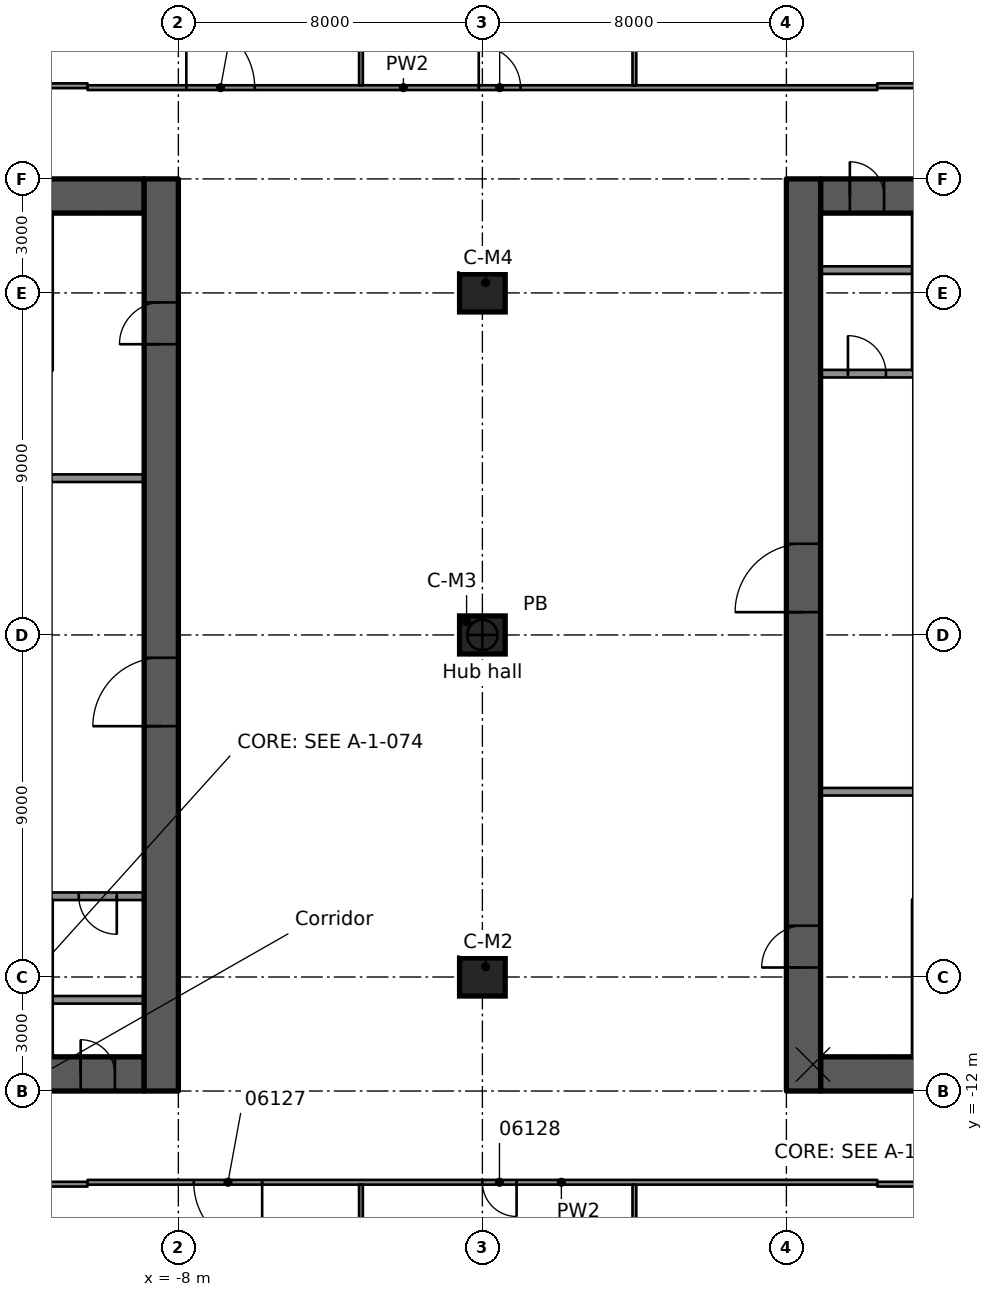
"""IFC4 building model, lengths in metres.
Left out: names, types, materials, properties, quantities, classifications, styles, units other than length and angle.
Written with IfcOpenShell. Run it as: python <this file> out.ifc"""

import sys

from ifc_helpers import new_model, si_unit, direction, frame, frame_2d, origin, origin_2d, place, context, subcontext, project, spatial, rectangle, extrude, element, fill, save


model = new_model("IFC4")
c1 = context("Model", 3, precision=1e-05, world=origin(), true_north=direction((0.0, 1.0)))
c2 = subcontext(c1, "Body", "Model", "MODEL_VIEW")
j1 = project(units=[si_unit("LENGTHUNIT", "METRE"), si_unit("PLANEANGLEUNIT", "RADIAN")], contexts=[c1])
p1 = place(None, origin())
s1 = spatial("IfcSite", under=j1, at=p1, CompositionType="ELEMENT")
p2 = place(p1, origin())
s2 = spatial("IfcBuilding", under=s1, at=p2, CompositionType="ELEMENT")
p3 = place(p2, frame((0.0, 0.0, 29.2)))
s3 = spatial("IfcBuildingStorey", under=s2, at=p3, CompositionType="ELEMENT", Elevation=29.2)
p4 = place(p3, frame((-18.1, 11.55, 0.0), z_axis=(0.0, 0.0, 1.0), x_axis=(1.0, 0.0, 0.0)))
e1 = element("IfcWall", 1, at=p4, inside=s3, PredefinedType="SHEAR", context=c2, shape_type="SweptSolid", body=[
    extrude(rectangle(XDim=9.2, YDim=0.9, at=frame_2d((4.6, 0.0))), origin(), (0.0, 0.0, 1.0), 4.1),
])
p5 = place(p4, frame((5.1, 0.0, 0.0)))
e2 = element("IfcOpeningElement", 2, at=p5, cuts=e1, PredefinedType="OPENING", context=c2, shape_type="SweptSolid", body=[
    extrude(rectangle(XDim=1.1, YDim=2.1, at=frame_2d((0.55, 1.05))), frame((0.0, 0.46, 0.0), z_axis=(0.0, -1.0, 0.0), x_axis=(1.0, 0.0, 0.0)), (0.0, 0.0, 1.0), 0.92),
])
p6 = place(p3, frame((-18.1, -11.55, 0.0), z_axis=(0.0, 0.0, 1.0), x_axis=(1.0, 0.0, 0.0)))
e3 = element("IfcWall", 3, at=p6, inside=s3, PredefinedType="SHEAR", context=c2, shape_type="SweptSolid", body=[
    extrude(rectangle(XDim=9.2, YDim=0.9, at=frame_2d((4.6, 0.0))), origin(), (0.0, 0.0, 1.0), 4.1),
])
p7 = place(p6, frame((5.1, 0.0, 0.0)))
e4 = element("IfcOpeningElement", 4, at=p7, cuts=e3, PredefinedType="OPENING", context=c2, shape_type="SweptSolid", body=[
    extrude(rectangle(XDim=1.1, YDim=2.1, at=frame_2d((0.55, 1.05))), frame((0.0, 0.46, 0.0), z_axis=(0.0, -1.0, 0.0), x_axis=(1.0, 0.0, 0.0)), (0.0, 0.0, 1.0), 0.92),
])
p8 = place(p6, frame((7.53, 0.0, 0.0)))
e5 = element("IfcOpeningElement", 5, at=p8, cuts=e3, PredefinedType="OPENING", context=c2, shape_type="SweptSolid", body=[
    extrude(rectangle(XDim=0.9, YDim=2.1, at=frame_2d((0.45, 1.05))), frame((0.0, 0.46, 0.0), z_axis=(0.0, -1.0, 0.0), x_axis=(1.0, 0.0, 0.0)), (0.0, 0.0, 1.0), 0.92),
])
p9 = place(p3, frame((-8.45, -12.0, 0.0), z_axis=(0.0, 0.0, 1.0), x_axis=(0.0, 1.0, 0.0)))
e6 = element("IfcWall", 6, at=p9, inside=s3, PredefinedType="SHEAR", context=c2, shape_type="SweptSolid", body=[
    extrude(rectangle(XDim=24.0, YDim=0.9, at=frame_2d((12.0, 0.0))), origin(), (0.0, 0.0, 1.0), 4.1),
])
p10 = place(p9, frame((9.6, 0.0, 0.0)))
e7 = element("IfcOpeningElement", 7, at=p10, cuts=e6, PredefinedType="OPENING", context=c2, shape_type="SweptSolid", body=[
    extrude(rectangle(XDim=1.8, YDim=2.1, at=frame_2d((0.9, 1.05))), frame((0.0, 0.46, 0.0), z_axis=(0.0, -1.0, 0.0), x_axis=(1.0, 0.0, 0.0)), (0.0, 0.0, 1.0), 0.92),
])
p11 = place(p9, frame((19.65, 0.0, 0.0)))
e8 = element("IfcOpeningElement", 8, at=p11, cuts=e6, PredefinedType="OPENING", context=c2, shape_type="SweptSolid", body=[
    extrude(rectangle(XDim=1.1, YDim=2.1, at=frame_2d((0.55, 1.05))), frame((0.0, 0.46, 0.0), z_axis=(0.0, -1.0, 0.0), x_axis=(1.0, 0.0, 0.0)), (0.0, 0.0, 1.0), 0.92),
])
p12 = place(p3, frame((8.9, 11.55, 0.0), z_axis=(0.0, 0.0, 1.0), x_axis=(1.0, 0.0, 0.0)))
e9 = element("IfcWall", 9, at=p12, inside=s3, PredefinedType="SHEAR", context=c2, shape_type="SweptSolid", body=[
    extrude(rectangle(XDim=9.2, YDim=0.9, at=frame_2d((4.6, 0.0))), origin(), (0.0, 0.0, 1.0), 4.1),
])
p13 = place(p12, frame((3.0, 0.0, 0.0)))
e10 = element("IfcOpeningElement", 10, at=p13, cuts=e9, PredefinedType="OPENING", context=c2, shape_type="SweptSolid", body=[
    extrude(rectangle(XDim=1.1, YDim=2.1, at=frame_2d((0.55, 1.05))), frame((0.0, 0.46, 0.0), z_axis=(0.0, -1.0, 0.0), x_axis=(1.0, 0.0, 0.0)), (0.0, 0.0, 1.0), 0.92),
])
p14 = place(p12, frame((0.77, 0.0, 0.0)))
e11 = element("IfcOpeningElement", 11, at=p14, cuts=e9, PredefinedType="OPENING", context=c2, shape_type="SweptSolid", body=[
    extrude(rectangle(XDim=0.9, YDim=2.1, at=frame_2d((0.45, 1.05))), frame((0.0, 0.46, 0.0), z_axis=(0.0, -1.0, 0.0), x_axis=(1.0, 0.0, 0.0)), (0.0, 0.0, 1.0), 0.92),
])
p15 = place(p3, frame((8.9, -11.55, 0.0), z_axis=(0.0, 0.0, 1.0), x_axis=(1.0, 0.0, 0.0)))
e12 = element("IfcWall", 12, at=p15, inside=s3, PredefinedType="SHEAR", context=c2, shape_type="SweptSolid", body=[
    extrude(rectangle(XDim=9.2, YDim=0.9, at=frame_2d((4.6, 0.0))), origin(), (0.0, 0.0, 1.0), 4.1),
])
p16 = place(p15, frame((3.0, 0.0, 0.0)))
e13 = element("IfcOpeningElement", 13, at=p16, cuts=e12, PredefinedType="OPENING", context=c2, shape_type="SweptSolid", body=[
    extrude(rectangle(XDim=1.1, YDim=2.1, at=frame_2d((0.55, 1.05))), frame((0.0, 0.46, 0.0), z_axis=(0.0, -1.0, 0.0), x_axis=(1.0, 0.0, 0.0)), (0.0, 0.0, 1.0), 0.92),
])
p17 = place(p3, frame((8.45, -12.0, 0.0), z_axis=(0.0, 0.0, 1.0), x_axis=(0.0, 1.0, 0.0)))
e14 = element("IfcWall", 14, at=p17, inside=s3, PredefinedType="SHEAR", context=c2, shape_type="SweptSolid", body=[
    extrude(rectangle(XDim=24.0, YDim=0.9, at=frame_2d((12.0, 0.0))), origin(), (0.0, 0.0, 1.0), 4.1),
])
p18 = place(p17, frame((12.6, 0.0, 0.0)))
e15 = element("IfcOpeningElement", 15, at=p18, cuts=e14, PredefinedType="OPENING", context=c2, shape_type="SweptSolid", body=[
    extrude(rectangle(XDim=1.8, YDim=2.1, at=frame_2d((0.9, 1.05))), frame((0.0, 0.46, 0.0), z_axis=(0.0, -1.0, 0.0), x_axis=(1.0, 0.0, 0.0)), (0.0, 0.0, 1.0), 0.92),
])
p19 = place(p17, frame((3.25, 0.0, 0.0)))
e16 = element("IfcOpeningElement", 16, at=p19, cuts=e14, PredefinedType="OPENING", context=c2, shape_type="SweptSolid", body=[
    extrude(rectangle(XDim=1.1, YDim=2.1, at=frame_2d((0.55, 1.05))), frame((0.0, 0.46, 0.0), z_axis=(0.0, -1.0, 0.0), x_axis=(1.0, 0.0, 0.0)), (0.0, 0.0, 1.0), 0.92),
])
for number, where, z_axis, x_axis in (
    (17, (0.0, -9.0, 0.0), (0.0, 0.0, 1.0), (1.0, 0.0, 0.0)),
    (18, (0.0, 0.0, 0.0), (0.0, 0.0, 1.0), (1.0, 0.0, 0.0)),
    (19, (0.0, 9.0, 0.0), (0.0, 0.0, 1.0), (1.0, 0.0, 0.0)),
):
    element("IfcColumn", number, at=place(p3, frame(where, z_axis=z_axis, x_axis=x_axis)), inside=s3, PredefinedType="COLUMN", context=c2, shape_type="SweptSolid", body=[
        extrude(rectangle(XDim=1.2, YDim=1.0, at=origin_2d()), origin(), (0.0, 0.0, 1.0), 4.1),
    ])
p20 = place(p3, frame((-8.9, 4.125, 0.0), z_axis=(0.0, 0.0, 1.0), x_axis=(-1.0, 0.0, 0.0)))
e20 = element("IfcWall", 20, at=p20, inside=s3, PredefinedType="PARTITIONING", context=c2, shape_type="SweptSolid", body=[
    extrude(rectangle(XDim=2.44, YDim=0.2, at=frame_2d((1.22, 0.0))), origin(), (0.0, 0.0, 1.0), 3.68),
])
p21 = place(p3, frame((-8.9, -6.875, 0.0), z_axis=(0.0, 0.0, 1.0), x_axis=(-1.0, 0.0, 0.0)))
e21 = element("IfcWall", 21, at=p21, inside=s3, PredefinedType="PARTITIONING", context=c2, shape_type="SweptSolid", body=[
    extrude(rectangle(XDim=2.44, YDim=0.2, at=frame_2d((1.22, 0.0))), origin(), (0.0, 0.0, 1.0), 3.68),
])
p22 = place(p21, frame((0.72, 0.0, 0.0)))
e22 = element("IfcOpeningElement", 22, at=p22, cuts=e21, PredefinedType="OPENING", context=c2, shape_type="SweptSolid", body=[
    extrude(rectangle(XDim=1.0, YDim=2.1, at=frame_2d((0.5, 1.05))), frame((0.0, 0.11, 0.0), z_axis=(0.0, -1.0, 0.0), x_axis=(1.0, 0.0, 0.0)), (0.0, 0.0, 1.0), 0.22),
])
for number, where, z_axis, x_axis in (
    (23, (-8.9, -9.6, 0.0), (0.0, 0.0, 1.0), (-1.0, 0.0, 0.0)),
    (24, (8.9, -4.125, 0.0), (0.0, 0.0, 1.0), (1.0, 0.0, 0.0)),
):
    element("IfcWall", number, at=place(p3, frame(where, z_axis=z_axis, x_axis=x_axis)), inside=s3, PredefinedType="PARTITIONING", context=c2, shape_type="SweptSolid", body=[
        extrude(rectangle(XDim=2.44, YDim=0.2, at=frame_2d((1.22, 0.0))), origin(), (0.0, 0.0, 1.0), 3.68),
    ])
p23 = place(p3, frame((8.9, 6.875, 0.0), z_axis=(0.0, 0.0, 1.0), x_axis=(1.0, 0.0, 0.0)))
e25 = element("IfcWall", 25, at=p23, inside=s3, PredefinedType="PARTITIONING", context=c2, shape_type="SweptSolid", body=[
    extrude(rectangle(XDim=2.44, YDim=0.2, at=frame_2d((1.22, 0.0))), origin(), (0.0, 0.0, 1.0), 3.68),
])
p24 = place(p23, frame((0.72, 0.0, 0.0)))
e26 = element("IfcOpeningElement", 26, at=p24, cuts=e25, PredefinedType="OPENING", context=c2, shape_type="SweptSolid", body=[
    extrude(rectangle(XDim=1.0, YDim=2.1, at=frame_2d((0.5, 1.05))), frame((0.0, 0.11, 0.0), z_axis=(0.0, -1.0, 0.0), x_axis=(1.0, 0.0, 0.0)), (0.0, 0.0, 1.0), 0.22),
])
p25 = place(p3, frame((8.9, 9.6, 0.0), z_axis=(0.0, 0.0, 1.0), x_axis=(1.0, 0.0, 0.0)))
e27 = element("IfcWall", 27, at=p25, inside=s3, PredefinedType="PARTITIONING", context=c2, shape_type="SweptSolid", body=[
    extrude(rectangle(XDim=2.44, YDim=0.2, at=frame_2d((1.22, 0.0))), origin(), (0.0, 0.0, 1.0), 3.68),
])
p26 = place(p3, frame((-18.262, -14.451, 0.0), z_axis=(0.0, 0.0, 1.0), x_axis=(1.0, 0.0, 0.0)))
e28 = element("IfcWall", 28, at=p26, inside=s3, PredefinedType="PARTITIONING", context=c2, shape_type="SweptSolid", body=[
    extrude(rectangle(XDim=7.871, YDim=0.125, at=frame_2d((3.936, 0.0))), origin(), (0.0, 0.0, 1.0), 3.66),
])
p27 = place(p3, frame((10.391, -14.451, 0.0), z_axis=(0.0, 0.0, 1.0), x_axis=(1.0, 0.0, 0.0)))
e29 = element("IfcWall", 29, at=p27, inside=s3, PredefinedType="PARTITIONING", context=c2, shape_type="SweptSolid", body=[
    extrude(rectangle(XDim=6.911, YDim=0.125, at=frame_2d((3.456, 0.0))), origin(), (0.0, 0.0, 1.0), 3.66),
])
p28 = place(p3, frame((10.391, -14.401, 0.0), z_axis=(0.0, 0.0, 1.0), x_axis=(-1.0, 0.0, 0.0)))
e30 = element("IfcWall", 30, at=p28, inside=s3, PredefinedType="PARTITIONING", context=c2, shape_type="SweptSolid", body=[
    extrude(rectangle(XDim=20.781, YDim=0.125, at=frame_2d((10.391, 0.0))), origin(), (0.0, 0.0, 1.0), 3.66),
])
p29 = place(p28, frame((16.186, 0.0, 0.0)))
e31 = element("IfcOpeningElement", 31, at=p29, cuts=e30, PredefinedType="OPENING", context=c2, shape_type="SweptSolid", body=[
    extrude(rectangle(XDim=1.8, YDim=2.1, at=frame_2d((0.9, 1.05))), frame((0.0, 0.073, 0.0), z_axis=(0.0, -1.0, 0.0), x_axis=(1.0, 0.0, 0.0)), (0.0, 0.0, 1.0), 0.145),
])
p30 = place(p28, frame((9.491, 0.0, 0.0)))
e32 = element("IfcOpeningElement", 32, at=p30, cuts=e30, PredefinedType="OPENING", context=c2, shape_type="SweptSolid", body=[
    extrude(rectangle(XDim=0.9, YDim=2.1, at=frame_2d((0.45, 1.05))), frame((0.0, 0.073, 0.0), z_axis=(0.0, -1.0, 0.0), x_axis=(1.0, 0.0, 0.0)), (0.0, 0.0, 1.0), 0.145),
])
p31 = place(p3, frame((-10.39, 14.401, 0.0), z_axis=(0.0, 0.0, 1.0), x_axis=(1.0, 0.0, 0.0)))
e33 = element("IfcWall", 33, at=p31, inside=s3, PredefinedType="PARTITIONING", context=c2, shape_type="SweptSolid", body=[
    extrude(rectangle(XDim=20.781, YDim=0.125, at=frame_2d((10.391, 0.0))), origin(), (0.0, 0.0, 1.0), 3.66),
])
p32 = place(p31, frame((10.295, 0.0, 0.0)))
e34 = element("IfcOpeningElement", 34, at=p32, cuts=e33, PredefinedType="OPENING", context=c2, shape_type="SweptSolid", body=[
    extrude(rectangle(XDim=1.1, YDim=2.1, at=frame_2d((0.55, 1.05))), frame((0.0, 0.073, 0.0), z_axis=(0.0, -1.0, 0.0), x_axis=(1.0, 0.0, 0.0)), (0.0, 0.0, 1.0), 0.145),
])
p33 = place(p31, frame((2.6, 0.0, 0.0)))
e35 = element("IfcOpeningElement", 35, at=p33, cuts=e33, PredefinedType="OPENING", context=c2, shape_type="SweptSolid", body=[
    extrude(rectangle(XDim=1.8, YDim=2.1, at=frame_2d((0.9, 1.05))), frame((0.0, 0.073, 0.0), z_axis=(0.0, -1.0, 0.0), x_axis=(1.0, 0.0, 0.0)), (0.0, 0.0, 1.0), 0.145),
])
p34 = place(p3, frame((-21.387, 14.451, 0.0), z_axis=(0.0, 0.0, 1.0), x_axis=(1.0, 0.0, 0.0)))
e36 = element("IfcWall", 36, at=p34, inside=s3, PredefinedType="PARTITIONING", context=c2, shape_type="SweptSolid", body=[
    extrude(rectangle(XDim=10.996, YDim=0.125, at=frame_2d((5.498, 0.0))), origin(), (0.0, 0.0, 1.0), 3.66),
])
p35 = place(p34, frame((3.788, 0.0, 0.0)))
e37 = element("IfcOpeningElement", 37, at=p35, cuts=e36, PredefinedType="OPENING", context=c2, shape_type="SweptSolid", body=[
    extrude(rectangle(XDim=1.8, YDim=2.1, at=frame_2d((0.9, 1.05))), frame((0.0, 0.073, 0.0), z_axis=(0.0, -1.0, 0.0), x_axis=(1.0, 0.0, 0.0)), (0.0, 0.0, 1.0), 0.145),
])
p36 = place(p3, frame((10.391, 14.451, 0.0), z_axis=(0.0, 0.0, 1.0), x_axis=(1.0, 0.0, 0.0)))
e38 = element("IfcWall", 38, at=p36, inside=s3, PredefinedType="PARTITIONING", context=c2, shape_type="SweptSolid", body=[
    extrude(rectangle(XDim=10.996, YDim=0.125, at=frame_2d((5.498, 0.0))), origin(), (0.0, 0.0, 1.0), 3.66),
])
p37 = place(p36, frame((1.85, 0.0, 0.0)))
e39 = element("IfcOpeningElement", 39, at=p37, cuts=e38, PredefinedType="OPENING", context=c2, shape_type="SweptSolid", body=[
    extrude(rectangle(XDim=1.8, YDim=2.1, at=frame_2d((0.9, 1.05))), frame((0.0, 0.073, 0.0), z_axis=(0.0, -1.0, 0.0), x_axis=(1.0, 0.0, 0.0)), (0.0, 0.0, 1.0), 0.145),
])
p38 = place(p3, frame((4.0, -30.25, 0.0), z_axis=(0.0, 0.0, 1.0), x_axis=(0.0, 1.0, 0.0)))
e40 = element("IfcWall", 40, at=p38, inside=s3, PredefinedType="PARTITIONING", context=c2, shape_type="SweptSolid", body=[
    extrude(rectangle(XDim=15.787, YDim=0.1, at=frame_2d((7.894, 0.0))), origin(), (0.0, 0.0, 1.0), 3.66),
])
for number, where, z_axis, x_axis in (
    (41, (4.0, 14.463, 0.0), (0.0, 0.0, 1.0), (0.0, 1.0, 0.0)),
    (42, (-3.195, -30.25, 0.0), (0.0, 0.0, 1.0), (0.0, 1.0, 0.0)),
):
    element("IfcWall", number, at=place(p3, frame(where, z_axis=z_axis, x_axis=x_axis)), inside=s3, PredefinedType="PARTITIONING", context=c2, shape_type="SweptSolid", body=[
        extrude(rectangle(XDim=15.787, YDim=0.1, at=frame_2d((7.894, 0.0))), origin(), (0.0, 0.0, 1.0), 3.025),
    ])
p39 = place(p3, frame((-3.195, 14.463, 0.0), z_axis=(0.0, 0.0, 1.0), x_axis=(0.0, 1.0, 0.0)))
e43 = element("IfcWall", 43, at=p39, inside=s3, PredefinedType="PARTITIONING", context=c2, shape_type="SweptSolid", body=[
    extrude(rectangle(XDim=15.787, YDim=0.1, at=frame_2d((7.894, 0.0))), origin(), (0.0, 0.0, 1.0), 3.66),
])
p40 = place(p10, origin())
e44 = element("IfcDoor", 44, at=p40, inside=s3, OperationType="SINGLE_SWING_LEFT", PredefinedType="DOOR", context=c2, shape_type="SweptSolid", body=[
    extrude(rectangle(XDim=1.8, YDim=2.1, at=frame_2d((0.9, 1.05))), frame((0.0, 0.025, 0.0), z_axis=(0.0, -1.0, 0.0), x_axis=(1.0, 0.0, 0.0)), (0.0, 0.0, 1.0), 0.05),
])
fill(e7, e44)
p41 = place(p11, origin())
e45 = element("IfcDoor", 45, at=p41, inside=s3, OperationType="SINGLE_SWING_RIGHT", PredefinedType="DOOR", context=c2, shape_type="SweptSolid", body=[
    extrude(rectangle(XDim=1.1, YDim=2.1, at=frame_2d((0.55, 1.05))), frame((0.0, 0.025, 0.0), z_axis=(0.0, -1.0, 0.0), x_axis=(1.0, 0.0, 0.0)), (0.0, 0.0, 1.0), 0.05),
])
fill(e8, e45)
p42 = place(p8, origin())
e46 = element("IfcDoor", 46, at=p42, inside=s3, OperationType="SINGLE_SWING_RIGHT", PredefinedType="DOOR", context=c2, shape_type="SweptSolid", body=[
    extrude(rectangle(XDim=0.9, YDim=2.1, at=frame_2d((0.45, 1.05))), frame((0.0, 0.025, 0.0), z_axis=(0.0, -1.0, 0.0), x_axis=(1.0, 0.0, 0.0)), (0.0, 0.0, 1.0), 0.05),
])
fill(e5, e46)
p43 = place(p22, origin())
e47 = element("IfcDoor", 47, at=p43, inside=s3, OperationType="SINGLE_SWING_RIGHT", PredefinedType="DOOR", context=c2, shape_type="SweptSolid", body=[
    extrude(rectangle(XDim=1.0, YDim=2.1, at=frame_2d((0.5, 1.05))), frame((0.0, 0.025, 0.0), z_axis=(0.0, -1.0, 0.0), x_axis=(1.0, 0.0, 0.0)), (0.0, 0.0, 1.0), 0.05),
])
fill(e22, e47)
p44 = place(p18, origin())
e48 = element("IfcDoor", 48, at=p44, inside=s3, OperationType="SINGLE_SWING_RIGHT", PredefinedType="DOOR", context=c2, shape_type="SweptSolid", body=[
    extrude(rectangle(XDim=1.8, YDim=2.1, at=frame_2d((0.9, 1.05))), frame((0.0, 0.025, 0.0), z_axis=(0.0, -1.0, 0.0), x_axis=(1.0, 0.0, 0.0)), (0.0, 0.0, 1.0), 0.05),
])
fill(e15, e48)
p45 = place(p19, origin())
e49 = element("IfcDoor", 49, at=p45, inside=s3, OperationType="SINGLE_SWING_LEFT", PredefinedType="DOOR", context=c2, shape_type="SweptSolid", body=[
    extrude(rectangle(XDim=1.1, YDim=2.1, at=frame_2d((0.55, 1.05))), frame((0.0, 0.025, 0.0), z_axis=(0.0, -1.0, 0.0), x_axis=(1.0, 0.0, 0.0)), (0.0, 0.0, 1.0), 0.05),
])
fill(e16, e49)
p46 = place(p14, origin())
e50 = element("IfcDoor", 50, at=p46, inside=s3, OperationType="SINGLE_SWING_LEFT", PredefinedType="DOOR", context=c2, shape_type="SweptSolid", body=[
    extrude(rectangle(XDim=0.9, YDim=2.1, at=frame_2d((0.45, 1.05))), frame((0.0, 0.025, 0.0), z_axis=(0.0, -1.0, 0.0), x_axis=(1.0, 0.0, 0.0)), (0.0, 0.0, 1.0), 0.05),
])
fill(e11, e50)
p47 = place(p24, origin())
e51 = element("IfcDoor", 51, at=p47, inside=s3, OperationType="SINGLE_SWING_RIGHT", PredefinedType="DOOR", context=c2, shape_type="SweptSolid", body=[
    extrude(rectangle(XDim=1.0, YDim=2.1, at=frame_2d((0.5, 1.05))), frame((0.0, 0.025, 0.0), z_axis=(0.0, -1.0, 0.0), x_axis=(1.0, 0.0, 0.0)), (0.0, 0.0, 1.0), 0.05),
])
fill(e26, e51)
p48 = place(p29, origin())
e52 = element("IfcDoor", 52, at=p48, inside=s3, OperationType="DOUBLE_DOOR_SINGLE_SWING", PredefinedType="DOOR", context=c2, shape_type="SweptSolid", body=[
    extrude(rectangle(XDim=1.8, YDim=2.1, at=frame_2d((0.9, 1.05))), frame((0.0, 0.025, 0.0), z_axis=(0.0, -1.0, 0.0), x_axis=(1.0, 0.0, 0.0)), (0.0, 0.0, 1.0), 0.05),
])
fill(e31, e52)
p49 = place(p30, origin())
e53 = element("IfcDoor", 53, at=p49, inside=s3, OperationType="SINGLE_SWING_LEFT", PredefinedType="DOOR", context=c2, shape_type="SweptSolid", body=[
    extrude(rectangle(XDim=0.9, YDim=2.1, at=frame_2d((0.45, 1.05))), frame((0.0, 0.025, 0.0), z_axis=(0.0, -1.0, 0.0), x_axis=(1.0, 0.0, 0.0)), (0.0, 0.0, 1.0), 0.05),
])
fill(e32, e53)
p50 = place(p32, origin())
e54 = element("IfcDoor", 54, at=p50, inside=s3, OperationType="SINGLE_SWING_RIGHT", PredefinedType="DOOR", context=c2, shape_type="SweptSolid", body=[
    extrude(rectangle(XDim=1.1, YDim=2.1, at=frame_2d((0.55, 1.05))), frame((0.0, 0.025, 0.0), z_axis=(0.0, -1.0, 0.0), x_axis=(1.0, 0.0, 0.0)), (0.0, 0.0, 1.0), 0.05),
])
fill(e34, e54)
p51 = place(p33, origin())
e55 = element("IfcDoor", 55, at=p51, inside=s3, OperationType="DOUBLE_DOOR_SINGLE_SWING", PredefinedType="DOOR", context=c2, shape_type="SweptSolid", body=[
    extrude(rectangle(XDim=1.8, YDim=2.1, at=frame_2d((0.9, 1.05))), frame((0.0, 0.025, 0.0), z_axis=(0.0, -1.0, 0.0), x_axis=(1.0, 0.0, 0.0)), (0.0, 0.0, 1.0), 0.05),
])
fill(e35, e55)
save(model, sys.argv[1])
